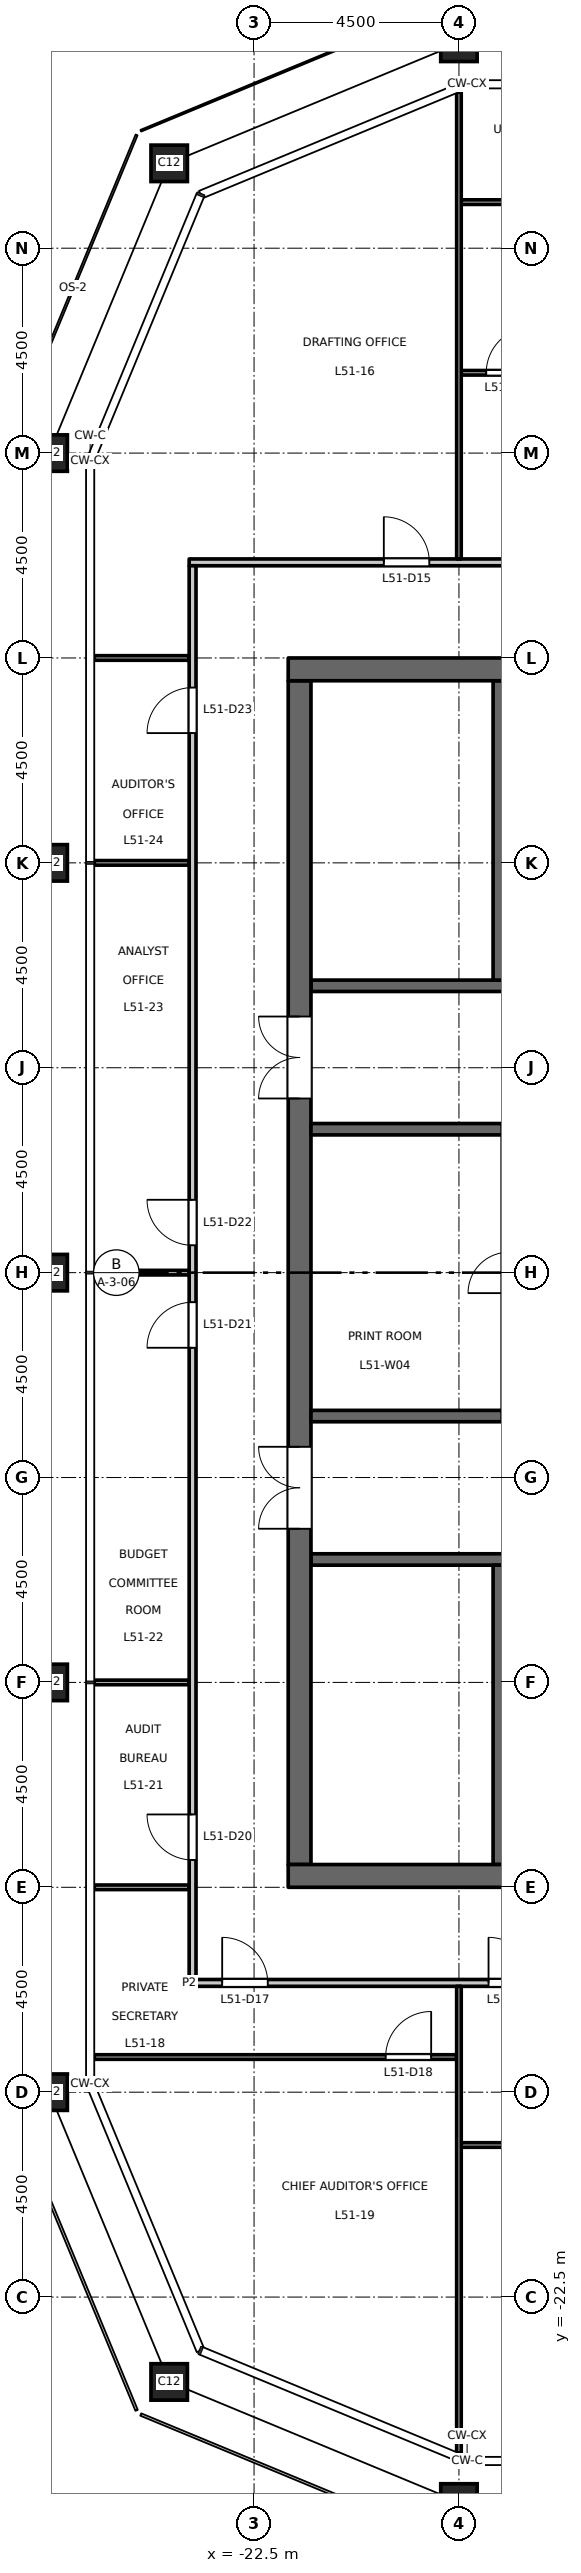
"""IFC4 building model, lengths in metres.
Left out: names, types, materials, properties, quantities, classifications, styles, units other than length and angle.
Written with IfcOpenShell. Run it as: python <this file> out.ifc"""

import sys

from ifc_helpers import new_model, si_unit, direction, frame, frame_2d, origin, origin_2d, place, context, subcontext, project, spatial, rectangle, hollow_rectangle, extrude, element, fill, save


model = new_model("IFC4")
c1 = context("Model", 3, precision=1e-05, world=origin(), true_north=direction((0.0, 1.0)))
c2 = subcontext(c1, "Body", "Model", "MODEL_VIEW")
j1 = project(units=[si_unit("LENGTHUNIT", "METRE"), si_unit("PLANEANGLEUNIT", "RADIAN")], contexts=[c1])
p1 = place(None, origin())
s1 = spatial("IfcSite", under=j1, at=p1, CompositionType="ELEMENT")
p2 = place(p1, origin())
s2 = spatial("IfcBuilding", under=s1, at=p2, CompositionType="ELEMENT")
p3 = place(p2, frame((0.0, 0.0, 237.7)))
s3 = spatial("IfcBuildingStorey", under=s2, at=p3, CompositionType="ELEMENT", Elevation=237.7)
for number, where, z_axis, x_axis in (
    (1, (-18.0, -27.0, 0.0), (0.0, 0.0, 1.0), (1.0, 0.0, 0.0)),
    (2, (-18.0, 27.0, 0.0), (0.0, 0.0, 1.0), (1.0, 0.0, 0.0)),
    (3, (-24.364, 24.364, 0.0), (0.0, 0.0, 1.0), (1.0, 0.0, 0.0)),
    (4, (-27.0, 18.0, 0.0), (0.0, 0.0, 1.0), (1.0, 0.0, 0.0)),
    (5, (-27.0, 9.0, 0.0), (0.0, 0.0, 1.0), (1.0, 0.0, 0.0)),
    (6, (-27.0, 0.0, 0.0), (0.0, 0.0, 1.0), (1.0, 0.0, 0.0)),
    (7, (-27.0, -9.0, 0.0), (0.0, 0.0, 1.0), (1.0, 0.0, 0.0)),
    (8, (-27.0, -18.0, 0.0), (0.0, 0.0, 1.0), (1.0, 0.0, 0.0)),
    (9, (-24.364, -24.364, 0.0), (0.0, 0.0, 1.0), (1.0, 0.0, 0.0)),
):
    element("IfcColumn", number, at=place(p3, frame(where, z_axis=z_axis, x_axis=x_axis)), inside=s3, PredefinedType="COLUMN", context=c2, shape_type="SweptSolid", body=[
        extrude(hollow_rectangle(XDim=0.8, YDim=0.8, WallThickness=0.045, at=origin_2d()), origin(), (0.0, 0.0, 1.0), 4.5),
    ])
p4 = place(p3, frame((-17.0, 6.3, 0.0), z_axis=(0.0, 0.0, 1.0), x_axis=(-1.0, 0.0, 0.0)))
e10 = element("IfcWall", 10, at=p4, inside=s3, PredefinedType="SHEAR", context=c2, shape_type="SweptSolid", body=[
    extrude(rectangle(XDim=4.25, YDim=0.25, at=frame_2d((2.125, 0.0))), origin(), (0.0, 0.0, 1.0), 4.35),
])
p5 = place(p3, frame((-12.15, -6.3, 0.0), z_axis=(0.0, 0.0, 1.0), x_axis=(-1.0, 0.0, 0.0)))
e11 = element("IfcWall", 11, at=p5, inside=s3, PredefinedType="SHEAR", context=c2, shape_type="SweptSolid", body=[
    extrude(rectangle(XDim=9.1, YDim=0.25, at=frame_2d((4.55, 0.0))), origin(), (0.0, 0.0, 1.0), 4.35),
])
p6 = place(p5, frame((1.8, 0.0, 0.0)))
e12 = element("IfcOpeningElement", 12, at=p6, cuts=e11, PredefinedType="OPENING", context=c2, shape_type="SweptSolid", body=[
    extrude(rectangle(XDim=1.0, YDim=2.1, at=frame_2d((0.5, 1.05))), frame((0.0, 0.135, 0.0), z_axis=(0.0, -1.0, 0.0), x_axis=(1.0, 0.0, 0.0)), (0.0, 0.0, 1.0), 0.27),
])
p7 = place(p3, frame((-21.5, -13.0, 0.0), z_axis=(0.0, 0.0, 1.0), x_axis=(0.0, 1.0, 0.0)))
e13 = element("IfcWall", 13, at=p7, inside=s3, PredefinedType="SHEAR", context=c2, shape_type="SweptSolid", body=[
    extrude(rectangle(XDim=26.0, YDim=0.5, at=frame_2d((13.0, 0.0))), origin(), (0.0, 0.0, 1.0), 4.35),
])
p8 = place(p7, frame((16.825, 0.0, 0.0)))
e14 = element("IfcOpeningElement", 14, at=p8, cuts=e13, PredefinedType="OPENING", context=c2, shape_type="SweptSolid", body=[
    extrude(rectangle(XDim=1.8, YDim=2.1, at=frame_2d((0.9, 1.05))), frame((0.0, 0.26, 0.0), z_axis=(0.0, -1.0, 0.0), x_axis=(1.0, 0.0, 0.0)), (0.0, 0.0, 1.0), 0.52),
])
p9 = place(p7, frame((7.375, 0.0, 0.0)))
e15 = element("IfcOpeningElement", 15, at=p9, cuts=e13, PredefinedType="OPENING", context=c2, shape_type="SweptSolid", body=[
    extrude(rectangle(XDim=1.8, YDim=2.1, at=frame_2d((0.9, 1.05))), frame((0.0, 0.26, 0.0), z_axis=(0.0, -1.0, 0.0), x_axis=(1.0, 0.0, 0.0)), (0.0, 0.0, 1.0), 0.52),
])
for number, where, z_axis, x_axis in (
    (16, (-17.05, 3.15, 0.0), (0.0, 0.0, 1.0), (-1.0, 0.0, 0.0)),
    (17, (-17.05, -3.15, 0.0), (0.0, 0.0, 1.0), (-1.0, 0.0, 0.0)),
):
    element("IfcWall", number, at=place(p3, frame(where, z_axis=z_axis, x_axis=x_axis)), inside=s3, PredefinedType="SHEAR", context=c2, shape_type="SweptSolid", body=[
        extrude(rectangle(XDim=4.2, YDim=0.25, at=frame_2d((2.1, 0.0))), origin(), (0.0, 0.0, 1.0), 4.35),
    ])
for number, where, z_axis, x_axis in (
    (18, (-17.0, 6.425, 0.0), (0.0, 0.0, 1.0), (0.0, 1.0, 0.0)),
    (19, (-17.0, -13.0, 0.0), (0.0, 0.0, 1.0), (0.0, 1.0, 0.0)),
):
    element("IfcWall", number, at=place(p3, frame(where, z_axis=z_axis, x_axis=x_axis)), inside=s3, PredefinedType="SHEAR", context=c2, shape_type="SweptSolid", body=[
        extrude(rectangle(XDim=6.575, YDim=0.5, at=frame_2d((3.288, 0.0))), origin(), (0.0, 0.0, 1.0), 4.35),
    ])
for number, where, z_axis, x_axis in (
    (20, (-8.25, 13.25, 0.0), (0.0, 0.0, 1.0), (-1.0, 0.0, 0.0)),
    (21, (-8.25, -13.25, 0.0), (0.0, 0.0, 1.0), (-1.0, 0.0, 0.0)),
):
    element("IfcWall", number, at=place(p3, frame(where, z_axis=z_axis, x_axis=x_axis)), inside=s3, PredefinedType="SHEAR", context=c2, shape_type="SweptSolid", body=[
        extrude(rectangle(XDim=13.5, YDim=0.5, at=frame_2d((6.75, 0.0))), origin(), (0.0, 0.0, 1.0), 4.35),
    ])
p10 = place(p3, frame((-17.95, -19.16, 0.0), z_axis=(0.0, 0.0, 1.0), x_axis=(1.0, 0.0, 0.0)))
e22 = element("IfcWall", 22, at=p10, inside=s3, PredefinedType="PARTITIONING", context=c2, shape_type="SweptSolid", body=[
    extrude(rectangle(XDim=8.9, YDim=0.1, at=frame_2d((4.45, 0.0))), origin(), (0.0, 0.0, 1.0), 4.35),
])
p11 = place(p10, frame((7.35, 0.0, 0.0)))
e23 = element("IfcOpeningElement", 23, at=p11, cuts=e22, PredefinedType="OPENING", context=c2, shape_type="SweptSolid", body=[
    extrude(rectangle(XDim=1.0, YDim=2.1, at=frame_2d((0.5, 1.05))), frame((0.0, 0.06, 0.0), z_axis=(0.0, -1.0, 0.0), x_axis=(1.0, 0.0, 0.0)), (0.0, 0.0, 1.0), 0.12),
])
p12 = place(p3, frame((-26.01, -17.228, 0.0), z_axis=(0.0, 0.0, 1.0), x_axis=(1.0, 0.0, 0.0)))
e24 = element("IfcWall", 24, at=p12, inside=s3, PredefinedType="PARTITIONING", context=c2, shape_type="SweptSolid", body=[
    extrude(rectangle(XDim=7.96, YDim=0.1, at=frame_2d((3.98, 0.0))), origin(), (0.0, 0.0, 1.0), 4.35),
])
p13 = place(p12, frame((6.4, 0.0, 0.0)))
e25 = element("IfcOpeningElement", 25, at=p13, cuts=e24, PredefinedType="OPENING", context=c2, shape_type="SweptSolid", body=[
    extrude(rectangle(XDim=1.0, YDim=2.1, at=frame_2d((0.5, 1.05))), frame((0.0, 0.06, 0.0), z_axis=(0.0, -1.0, 0.0), x_axis=(1.0, 0.0, 0.0)), (0.0, 0.0, 1.0), 0.12),
])
p14 = place(p3, frame((-23.925, -15.6, 0.0), z_axis=(0.0, 0.0, 1.0), x_axis=(1.0, 0.0, 0.0)))
e26 = element("IfcWall", 26, at=p14, inside=s3, PredefinedType="PARTITIONING", context=c2, shape_type="SweptSolid", body=[
    extrude(rectangle(XDim=47.85, YDim=0.15, at=frame_2d((23.925, 0.0))), origin(), (0.0, 0.0, 1.0), 4.35),
])
p15 = place(p14, frame((6.575, 0.0, 0.0)))
e27 = element("IfcOpeningElement", 27, at=p15, cuts=e26, PredefinedType="OPENING", context=c2, shape_type="SweptSolid", body=[
    extrude(rectangle(XDim=1.0, YDim=2.1, at=frame_2d((0.5, 1.05))), frame((0.0, 0.085, 0.0), z_axis=(0.0, -1.0, 0.0), x_axis=(1.0, 0.0, 0.0)), (0.0, 0.0, 1.0), 0.17),
])
p16 = place(p14, frame((15.575, 0.0, 0.0)))
e28 = element("IfcOpeningElement", 28, at=p16, cuts=e26, PredefinedType="OPENING", context=c2, shape_type="SweptSolid", body=[
    extrude(rectangle(XDim=1.0, YDim=2.1, at=frame_2d((0.5, 1.05))), frame((0.0, 0.085, 0.0), z_axis=(0.0, -1.0, 0.0), x_axis=(1.0, 0.0, 0.0)), (0.0, 0.0, 1.0), 0.17),
])
p17 = place(p14, frame((24.575, 0.0, 0.0)))
e29 = element("IfcOpeningElement", 29, at=p17, cuts=e26, PredefinedType="OPENING", context=c2, shape_type="SweptSolid", body=[
    extrude(rectangle(XDim=1.0, YDim=2.1, at=frame_2d((0.5, 1.05))), frame((0.0, 0.085, 0.0), z_axis=(0.0, -1.0, 0.0), x_axis=(1.0, 0.0, 0.0)), (0.0, 0.0, 1.0), 0.17),
])
p18 = place(p14, frame((40.325, 0.0, 0.0)))
e30 = element("IfcOpeningElement", 30, at=p18, cuts=e26, PredefinedType="OPENING", context=c2, shape_type="SweptSolid", body=[
    extrude(rectangle(XDim=1.0, YDim=2.1, at=frame_2d((0.5, 1.05))), frame((0.0, 0.085, 0.0), z_axis=(0.0, -1.0, 0.0), x_axis=(1.0, 0.0, 0.0)), (0.0, 0.0, 1.0), 0.17),
])
p19 = place(p14, frame((0.725, 0.0, 0.0)))
e31 = element("IfcOpeningElement", 31, at=p19, cuts=e26, PredefinedType="OPENING", context=c2, shape_type="SweptSolid", body=[
    extrude(rectangle(XDim=1.0, YDim=2.1, at=frame_2d((0.5, 1.05))), frame((0.0, 0.085, 0.0), z_axis=(0.0, -1.0, 0.0), x_axis=(1.0, 0.0, 0.0)), (0.0, 0.0, 1.0), 0.17),
])
p20 = place(p14, frame((42.575, 0.0, 0.0)))
e32 = element("IfcOpeningElement", 32, at=p20, cuts=e26, PredefinedType="OPENING", context=c2, shape_type="SweptSolid", body=[
    extrude(rectangle(XDim=1.0, YDim=2.1, at=frame_2d((0.5, 1.05))), frame((0.0, 0.085, 0.0), z_axis=(0.0, -1.0, 0.0), x_axis=(1.0, 0.0, 0.0)), (0.0, 0.0, 1.0), 0.17),
])
p21 = place(p3, frame((-26.01, -13.5, 0.0), z_axis=(0.0, 0.0, 1.0), x_axis=(1.0, 0.0, 0.0)))
e33 = element("IfcWall", 33, at=p21, inside=s3, PredefinedType="PARTITIONING", context=c2, shape_type="SweptSolid", body=[
    extrude(rectangle(XDim=2.085, YDim=0.1, at=frame_2d((1.042, 0.0))), origin(), (0.0, 0.0, 1.0), 3.95),
])
for number, where, z_axis, x_axis in (
    (34, (-26.01, -9.0, 0.0), (0.0, 0.0, 1.0), (1.0, 0.0, 0.0)),
    (35, (-26.01, 0.0, 0.0), (0.0, 0.0, 1.0), (1.0, 0.0, 0.0)),
    (36, (-26.01, 9.0, 0.0), (0.0, 0.0, 1.0), (1.0, 0.0, 0.0)),
    (37, (-26.01, 13.5, 0.0), (0.0, 0.0, 1.0), (1.0, 0.0, 0.0)),
):
    element("IfcWall", number, at=place(p3, frame(where, z_axis=z_axis, x_axis=x_axis)), inside=s3, PredefinedType="PARTITIONING", context=c2, shape_type="SweptSolid", body=[
        extrude(rectangle(XDim=2.085, YDim=0.1, at=frame_2d((1.042, 0.0))), origin(), (0.0, 0.0, 1.0), 4.35),
    ])
p22 = place(p3, frame((-23.925, 15.6, 0.0), z_axis=(0.0, 0.0, 1.0), x_axis=(1.0, 0.0, 0.0)))
e38 = element("IfcWall", 38, at=p22, inside=s3, PredefinedType="PARTITIONING", context=c2, shape_type="SweptSolid", body=[
    extrude(rectangle(XDim=47.85, YDim=0.15, at=frame_2d((23.925, 0.0))), origin(), (0.0, 0.0, 1.0), 4.35),
])
p23 = place(p22, frame((13.275, 0.0, 0.0)))
e39 = element("IfcOpeningElement", 39, at=p23, cuts=e38, PredefinedType="OPENING", context=c2, shape_type="SweptSolid", body=[
    extrude(rectangle(XDim=1.0, YDim=2.1, at=frame_2d((0.5, 1.05))), frame((0.0, 0.085, 0.0), z_axis=(0.0, -1.0, 0.0), x_axis=(1.0, 0.0, 0.0)), (0.0, 0.0, 1.0), 0.17),
])
p24 = place(p22, frame((15.525, 0.0, 0.0)))
e40 = element("IfcOpeningElement", 40, at=p24, cuts=e38, PredefinedType="OPENING", context=c2, shape_type="SweptSolid", body=[
    extrude(rectangle(XDim=1.0, YDim=2.1, at=frame_2d((0.5, 1.05))), frame((0.0, 0.085, 0.0), z_axis=(0.0, -1.0, 0.0), x_axis=(1.0, 0.0, 0.0)), (0.0, 0.0, 1.0), 0.17),
])
p25 = place(p22, frame((31.275, 0.0, 0.0)))
e41 = element("IfcOpeningElement", 41, at=p25, cuts=e38, PredefinedType="OPENING", context=c2, shape_type="SweptSolid", body=[
    extrude(rectangle(XDim=1.0, YDim=2.1, at=frame_2d((0.5, 1.05))), frame((0.0, 0.085, 0.0), z_axis=(0.0, -1.0, 0.0), x_axis=(1.0, 0.0, 0.0)), (0.0, 0.0, 1.0), 0.17),
])
p26 = place(p22, frame((33.525, 0.0, 0.0)))
e42 = element("IfcOpeningElement", 42, at=p26, cuts=e38, PredefinedType="OPENING", context=c2, shape_type="SweptSolid", body=[
    extrude(rectangle(XDim=1.0, YDim=2.1, at=frame_2d((0.5, 1.05))), frame((0.0, 0.085, 0.0), z_axis=(0.0, -1.0, 0.0), x_axis=(1.0, 0.0, 0.0)), (0.0, 0.0, 1.0), 0.17),
])
p27 = place(p22, frame((4.275, 0.0, 0.0)))
e43 = element("IfcOpeningElement", 43, at=p27, cuts=e38, PredefinedType="OPENING", context=c2, shape_type="SweptSolid", body=[
    extrude(rectangle(XDim=1.0, YDim=2.1, at=frame_2d((0.5, 1.05))), frame((0.0, 0.085, 0.0), z_axis=(0.0, -1.0, 0.0), x_axis=(1.0, 0.0, 0.0)), (0.0, 0.0, 1.0), 0.17),
])
p28 = place(p22, frame((42.625, 0.0, 0.0)))
e44 = element("IfcOpeningElement", 44, at=p28, cuts=e38, PredefinedType="OPENING", context=c2, shape_type="SweptSolid", body=[
    extrude(rectangle(XDim=1.0, YDim=2.1, at=frame_2d((0.5, 1.05))), frame((0.0, 0.085, 0.0), z_axis=(0.0, -1.0, 0.0), x_axis=(1.0, 0.0, 0.0)), (0.0, 0.0, 1.0), 0.17),
])
p29 = place(p3, frame((-17.95, 19.764, 0.0), z_axis=(0.0, 0.0, 1.0), x_axis=(1.0, 0.0, 0.0)))
e45 = element("IfcWall", 45, at=p29, inside=s3, PredefinedType="PARTITIONING", context=c2, shape_type="SweptSolid", body=[
    extrude(rectangle(XDim=8.9, YDim=0.1, at=frame_2d((4.45, 0.0))), origin(), (0.0, 0.0, 1.0), 4.35),
])
p30 = place(p29, frame((0.55, 0.0, 0.0)))
e46 = element("IfcOpeningElement", 46, at=p30, cuts=e45, PredefinedType="OPENING", context=c2, shape_type="SweptSolid", body=[
    extrude(rectangle(XDim=1.0, YDim=2.1, at=frame_2d((0.5, 1.05))), frame((0.0, 0.06, 0.0), z_axis=(0.0, -1.0, 0.0), x_axis=(1.0, 0.0, 0.0)), (0.0, 0.0, 1.0), 0.12),
])
p31 = place(p3, frame((-17.95, 23.512, 0.0), z_axis=(0.0, 0.0, 1.0), x_axis=(1.0, 0.0, 0.0)))
e47 = element("IfcWall", 47, at=p31, inside=s3, PredefinedType="PARTITIONING", context=c2, shape_type="SweptSolid", body=[
    extrude(rectangle(XDim=8.9, YDim=0.1, at=frame_2d((4.45, 0.0))), origin(), (0.0, 0.0, 1.0), 4.35),
])
p32 = place(p31, frame((7.3, 0.0, 0.0)))
e48 = element("IfcOpeningElement", 48, at=p32, cuts=e47, PredefinedType="OPENING", context=c2, shape_type="SweptSolid", body=[
    extrude(rectangle(XDim=1.0, YDim=2.1, at=frame_2d((0.5, 1.05))), frame((0.0, 0.06, 0.0), z_axis=(0.0, -1.0, 0.0), x_axis=(1.0, 0.0, 0.0)), (0.0, 0.0, 1.0), 0.12),
])
p33 = place(p3, frame((-23.85, -15.525, 0.0), z_axis=(0.0, 0.0, 1.0), x_axis=(0.0, 1.0, 0.0)))
e49 = element("IfcWall", 49, at=p33, inside=s3, PredefinedType="PARTITIONING", context=c2, shape_type="SweptSolid", body=[
    extrude(rectangle(XDim=31.05, YDim=0.15, at=frame_2d((15.525, 0.0))), origin(), (0.0, 0.0, 1.0), 4.35),
])
p34 = place(p33, frame((2.625, 0.0, 0.0)))
e50 = element("IfcOpeningElement", 50, at=p34, cuts=e49, PredefinedType="OPENING", context=c2, shape_type="SweptSolid", body=[
    extrude(rectangle(XDim=1.0, YDim=2.1, at=frame_2d((0.5, 1.05))), frame((0.0, 0.085, 0.0), z_axis=(0.0, -1.0, 0.0), x_axis=(1.0, 0.0, 0.0)), (0.0, 0.0, 1.0), 0.17),
])
p35 = place(p33, frame((13.875, 0.0, 0.0)))
e51 = element("IfcOpeningElement", 51, at=p35, cuts=e49, PredefinedType="OPENING", context=c2, shape_type="SweptSolid", body=[
    extrude(rectangle(XDim=1.0, YDim=2.1, at=frame_2d((0.5, 1.05))), frame((0.0, 0.085, 0.0), z_axis=(0.0, -1.0, 0.0), x_axis=(1.0, 0.0, 0.0)), (0.0, 0.0, 1.0), 0.17),
])
p36 = place(p33, frame((16.125, 0.0, 0.0)))
e52 = element("IfcOpeningElement", 52, at=p36, cuts=e49, PredefinedType="OPENING", context=c2, shape_type="SweptSolid", body=[
    extrude(rectangle(XDim=1.0, YDim=2.1, at=frame_2d((0.5, 1.05))), frame((0.0, 0.085, 0.0), z_axis=(0.0, -1.0, 0.0), x_axis=(1.0, 0.0, 0.0)), (0.0, 0.0, 1.0), 0.17),
])
p37 = place(p33, frame((27.375, 0.0, 0.0)))
e53 = element("IfcOpeningElement", 53, at=p37, cuts=e49, PredefinedType="OPENING", context=c2, shape_type="SweptSolid", body=[
    extrude(rectangle(XDim=1.0, YDim=2.1, at=frame_2d((0.5, 1.05))), frame((0.0, 0.085, 0.0), z_axis=(0.0, -1.0, 0.0), x_axis=(1.0, 0.0, 0.0)), (0.0, 0.0, 1.0), 0.17),
])
for number, where, z_axis, x_axis in (
    (54, (-18.0, -25.928, 0.0), (0.0, 0.0, 1.0), (0.0, 1.0, 0.0)),
    (55, (-18.0, 15.675, 0.0), (0.0, 0.0, 1.0), (0.0, 1.0, 0.0)),
):
    element("IfcWall", number, at=place(p3, frame(where, z_axis=z_axis, x_axis=x_axis)), inside=s3, PredefinedType="PARTITIONING", context=c2, shape_type="SweptSolid", body=[
        extrude(rectangle(XDim=10.253, YDim=0.1, at=frame_2d((5.126, 0.0))), origin(), (0.0, 0.0, 1.0), 3.65),
    ])
p38 = place(p8, origin())
e56 = element("IfcDoor", 56, at=p38, inside=s3, OperationType="DOUBLE_DOOR_DOUBLE_SWING", PredefinedType="DOOR", context=c2, shape_type="SweptSolid", body=[
    extrude(rectangle(XDim=1.8, YDim=2.1, at=frame_2d((0.9, 1.05))), frame((0.0, 0.025, 0.0), z_axis=(0.0, -1.0, 0.0), x_axis=(1.0, 0.0, 0.0)), (0.0, 0.0, 1.0), 0.05),
])
fill(e14, e56)
p39 = place(p9, origin())
e57 = element("IfcDoor", 57, at=p39, inside=s3, OperationType="DOUBLE_DOOR_DOUBLE_SWING", PredefinedType="DOOR", context=c2, shape_type="SweptSolid", body=[
    extrude(rectangle(XDim=1.8, YDim=2.1, at=frame_2d((0.9, 1.05))), frame((0.0, 0.025, 0.0), z_axis=(0.0, -1.0, 0.0), x_axis=(1.0, 0.0, 0.0)), (0.0, 0.0, 1.0), 0.05),
])
fill(e15, e57)
p40 = place(p30, origin())
e58 = element("IfcDoor", 58, at=p40, inside=s3, OperationType="SINGLE_SWING_RIGHT", PredefinedType="DOOR", context=c2, shape_type="SweptSolid", body=[
    extrude(rectangle(XDim=1.0, YDim=2.1, at=frame_2d((0.5, 1.05))), frame((0.0, 0.025, 0.0), z_axis=(0.0, -1.0, 0.0), x_axis=(1.0, 0.0, 0.0)), (0.0, 0.0, 1.0), 0.05),
])
fill(e46, e58)
p41 = place(p15, origin())
e59 = element("IfcDoor", 59, at=p41, inside=s3, OperationType="SINGLE_SWING_LEFT", PredefinedType="DOOR", context=c2, shape_type="SweptSolid", body=[
    extrude(rectangle(XDim=1.0, YDim=2.1, at=frame_2d((0.5, 1.05))), frame((0.0, 0.025, 0.0), z_axis=(0.0, -1.0, 0.0), x_axis=(1.0, 0.0, 0.0)), (0.0, 0.0, 1.0), 0.05),
])
fill(e27, e59)
p42 = place(p27, origin())
e60 = element("IfcDoor", 60, at=p42, inside=s3, OperationType="SINGLE_SWING_LEFT", PredefinedType="DOOR", context=c2, shape_type="SweptSolid", body=[
    extrude(rectangle(XDim=1.0, YDim=2.1, at=frame_2d((0.5, 1.05))), frame((0.0, 0.025, 0.0), z_axis=(0.0, -1.0, 0.0), x_axis=(1.0, 0.0, 0.0)), (0.0, 0.0, 1.0), 0.05),
])
fill(e43, e60)
p43 = place(p19, origin())
e61 = element("IfcDoor", 61, at=p43, inside=s3, OperationType="SINGLE_SWING_LEFT", PredefinedType="DOOR", context=c2, shape_type="SweptSolid", body=[
    extrude(rectangle(XDim=1.0, YDim=2.1, at=frame_2d((0.5, 1.05))), frame((0.0, 0.025, 0.0), z_axis=(0.0, -1.0, 0.0), x_axis=(1.0, 0.0, 0.0)), (0.0, 0.0, 1.0), 0.05),
])
fill(e31, e61)
p44 = place(p13, origin())
e62 = element("IfcDoor", 62, at=p44, inside=s3, OperationType="SINGLE_SWING_RIGHT", PredefinedType="DOOR", context=c2, shape_type="SweptSolid", body=[
    extrude(rectangle(XDim=1.0, YDim=2.1, at=frame_2d((0.5, 1.05))), frame((0.0, 0.025, 0.0), z_axis=(0.0, -1.0, 0.0), x_axis=(1.0, 0.0, 0.0)), (0.0, 0.0, 1.0), 0.05),
])
fill(e25, e62)
p45 = place(p34, origin())
e63 = element("IfcDoor", 63, at=p45, inside=s3, OperationType="SINGLE_SWING_RIGHT", PredefinedType="DOOR", context=c2, shape_type="SweptSolid", body=[
    extrude(rectangle(XDim=1.0, YDim=2.1, at=frame_2d((0.5, 1.05))), frame((0.0, 0.025, 0.0), z_axis=(0.0, -1.0, 0.0), x_axis=(1.0, 0.0, 0.0)), (0.0, 0.0, 1.0), 0.05),
])
fill(e50, e63)
p46 = place(p35, origin())
e64 = element("IfcDoor", 64, at=p46, inside=s3, OperationType="SINGLE_SWING_LEFT", PredefinedType="DOOR", context=c2, shape_type="SweptSolid", body=[
    extrude(rectangle(XDim=1.0, YDim=2.1, at=frame_2d((0.5, 1.05))), frame((0.0, 0.025, 0.0), z_axis=(0.0, -1.0, 0.0), x_axis=(1.0, 0.0, 0.0)), (0.0, 0.0, 1.0), 0.05),
])
fill(e51, e64)
p47 = place(p36, origin())
e65 = element("IfcDoor", 65, at=p47, inside=s3, OperationType="SINGLE_SWING_RIGHT", PredefinedType="DOOR", context=c2, shape_type="SweptSolid", body=[
    extrude(rectangle(XDim=1.0, YDim=2.1, at=frame_2d((0.5, 1.05))), frame((0.0, 0.025, 0.0), z_axis=(0.0, -1.0, 0.0), x_axis=(1.0, 0.0, 0.0)), (0.0, 0.0, 1.0), 0.05),
])
fill(e52, e65)
p48 = place(p37, origin())
e66 = element("IfcDoor", 66, at=p48, inside=s3, OperationType="SINGLE_SWING_LEFT", PredefinedType="DOOR", context=c2, shape_type="SweptSolid", body=[
    extrude(rectangle(XDim=1.0, YDim=2.1, at=frame_2d((0.5, 1.05))), frame((0.0, 0.025, 0.0), z_axis=(0.0, -1.0, 0.0), x_axis=(1.0, 0.0, 0.0)), (0.0, 0.0, 1.0), 0.05),
])
fill(e53, e66)
save(model, sys.argv[1])
